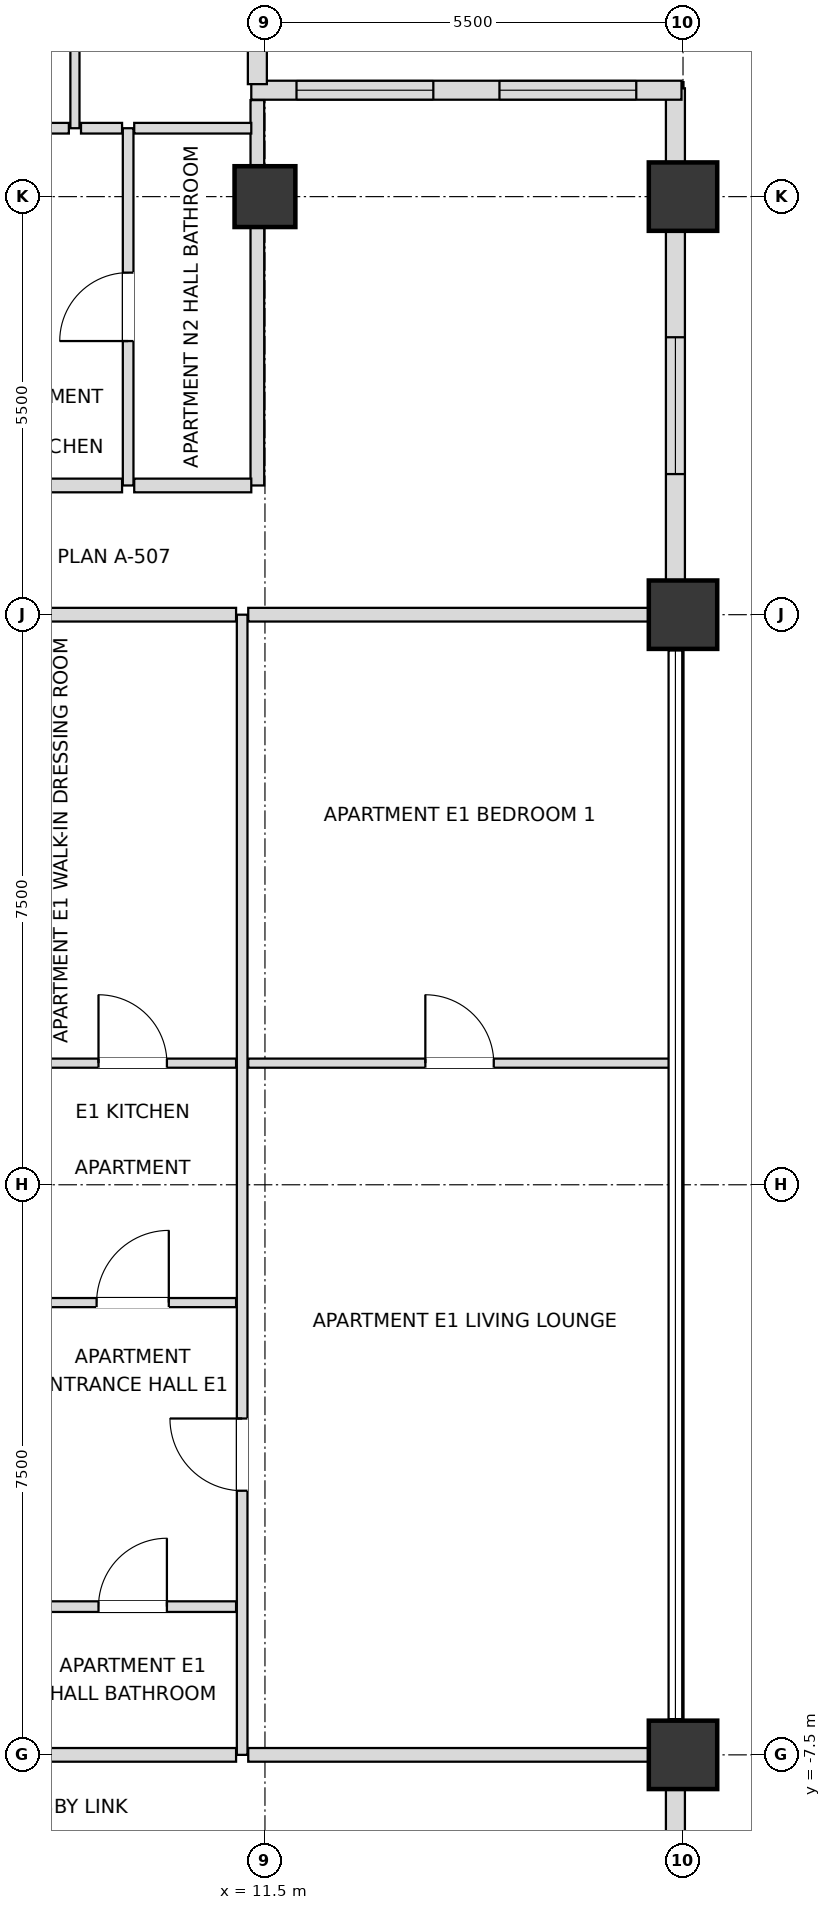
"""IFC4 building model, lengths in metres.
Left out: names, types, materials, properties, quantities, classifications, styles, units other than length and angle.
Written with IfcOpenShell. Run it as: python <this file> out.ifc"""

import sys

from ifc_helpers import new_model, si_unit, direction, frame, frame_2d, origin, origin_2d, place, context, subcontext, project, spatial, rectangle, extrude, element, fill, save


model = new_model("IFC4")
c1 = context("Model", 3, precision=1e-05, world=origin(), true_north=direction((0.0, 1.0)))
c2 = subcontext(c1, "Body", "Model", "MODEL_VIEW")
j1 = project(units=[si_unit("LENGTHUNIT", "METRE"), si_unit("PLANEANGLEUNIT", "RADIAN")], contexts=[c1])
p1 = place(None, origin())
s1 = spatial("IfcSite", under=j1, at=p1, CompositionType="ELEMENT")
p2 = place(p1, origin())
s2 = spatial("IfcBuilding", under=s1, at=p2, CompositionType="ELEMENT")
p3 = place(p2, frame((0.0, 0.0, 243.9)))
s3 = spatial("IfcBuildingStorey", under=s2, at=p3, CompositionType="ELEMENT", Elevation=243.9)
for number, where, z_axis, x_axis in (
    (1, (17.0, -7.5, 0.0), (0.0, 0.0, 1.0), (1.0, 0.0, 0.0)),
    (2, (17.0, 7.5, 0.0), (0.0, 0.0, 1.0), (1.0, 0.0, 0.0)),
    (3, (17.0, 13.0, 0.0), (0.0, 0.0, 1.0), (1.0, 0.0, 0.0)),
):
    element("IfcColumn", number, at=place(p3, frame(where, z_axis=z_axis, x_axis=x_axis)), inside=s3, PredefinedType="USERDEFINED", context=c2, shape_type="SweptSolid", body=[
        extrude(rectangle(XDim=0.9, YDim=0.9, at=origin_2d()), origin(), (0.0, 0.0, 1.0), 3.6),
    ])
p4 = place(p3, frame((11.5, 13.0, 0.0), z_axis=(0.0, 0.0, 1.0), x_axis=(1.0, 0.0, 0.0)))
e4 = element("IfcColumn", 4, at=p4, inside=s3, PredefinedType="COLUMN", context=c2, shape_type="SweptSolid", body=[
    extrude(rectangle(XDim=0.8, YDim=0.8, at=origin_2d()), origin(), (0.0, 0.0, 1.0), 3.6),
])
p5 = place(p3, frame((16.9, -12.555, 0.0), z_axis=(0.0, 0.0, 1.0), x_axis=(0.0, 1.0, 0.0)))
e5 = element("IfcWall", 5, at=p5, inside=s3, PredefinedType="SOLIDWALL", context=c2, shape_type="SweptSolid", body=[
    extrude(rectangle(XDim=4.61, YDim=0.25, at=frame_2d((2.305, 0.0))), origin(), (0.0, 0.0, 1.0), 2.748),
])
p6 = place(p5, frame((1.405, 0.0, 0.72)))
e6 = element("IfcOpeningElement", 6, at=p6, cuts=e5, PredefinedType="OPENING", context=c2, shape_type="SweptSolid", body=[
    extrude(rectangle(XDim=1.8, YDim=1.68, at=frame_2d((0.9, 0.84))), frame((0.0, 0.135, 0.0), z_axis=(0.0, -1.0, 0.0), x_axis=(1.0, 0.0, 0.0)), (0.0, 0.0, 1.0), 0.27),
])
p7 = place(p3, frame((16.9, 7.945, 0.0), z_axis=(0.0, 0.0, 1.0), x_axis=(0.0, 1.0, 0.0)))
e7 = element("IfcWall", 7, at=p7, inside=s3, PredefinedType="SOLIDWALL", context=c2, shape_type="SweptSolid", body=[
    extrude(rectangle(XDim=4.61, YDim=0.25, at=frame_2d((2.305, 0.0))), origin(), (0.0, 0.0, 1.0), 2.748),
])
p8 = place(p7, frame((1.405, 0.0, 0.72)))
e8 = element("IfcOpeningElement", 8, at=p8, cuts=e7, PredefinedType="OPENING", context=c2, shape_type="SweptSolid", body=[
    extrude(rectangle(XDim=1.8, YDim=1.68, at=frame_2d((0.9, 0.84))), frame((0.0, 0.135, 0.0), z_axis=(0.0, -1.0, 0.0), x_axis=(1.0, 0.0, 0.0)), (0.0, 0.0, 1.0), 0.27),
])
p9 = place(p3, frame((16.9, 13.445, 0.0), z_axis=(0.0, 0.0, 1.0), x_axis=(0.0, 1.0, 0.0)))
e9 = element("IfcWall", 9, at=p9, inside=s3, PredefinedType="SOLIDWALL", context=c2, shape_type="SweptSolid", body=[
    extrude(rectangle(XDim=0.98, YDim=0.25, at=frame_2d((0.49, 0.0))), origin(), (0.0, 0.0, 1.0), 2.748),
])
p10 = place(p3, frame((16.98, 14.4, 0.0), z_axis=(0.0, 0.0, 1.0), x_axis=(-1.0, 0.0, 0.0)))
e10 = element("IfcWall", 10, at=p10, inside=s3, PredefinedType="SOLIDWALL", context=c2, shape_type="SweptSolid", body=[
    extrude(rectangle(XDim=5.66, YDim=0.25, at=frame_2d((2.83, 0.0))), origin(), (0.0, 0.0, 1.0), 2.748),
])
p11 = place(p10, frame((0.595, 0.0, 0.72)))
e11 = element("IfcOpeningElement", 11, at=p11, cuts=e10, PredefinedType="OPENING", context=c2, shape_type="SweptSolid", body=[
    extrude(rectangle(XDim=1.8, YDim=1.68, at=frame_2d((0.9, 0.84))), frame((0.0, 0.135, 0.0), z_axis=(0.0, -1.0, 0.0), x_axis=(1.0, 0.0, 0.0)), (0.0, 0.0, 1.0), 0.27),
])
p12 = place(p10, frame((3.265, 0.0, 0.72)))
e12 = element("IfcOpeningElement", 12, at=p12, cuts=e10, PredefinedType="OPENING", context=c2, shape_type="SweptSolid", body=[
    extrude(rectangle(XDim=1.8, YDim=1.68, at=frame_2d((0.9, 0.84))), frame((0.0, 0.135, 0.0), z_axis=(0.0, -1.0, 0.0), x_axis=(1.0, 0.0, 0.0)), (0.0, 0.0, 1.0), 0.27),
])
p13 = place(p3, frame((11.4, 14.48, 0.0), z_axis=(0.0, 0.0, 1.0), x_axis=(0.0, 1.0, 0.0)))
e13 = element("IfcWall", 13, at=p13, inside=s3, PredefinedType="SOLIDWALL", context=c2, shape_type="SweptSolid", body=[
    extrude(rectangle(XDim=5.34, YDim=0.25, at=frame_2d((2.67, 0.0))), origin(), (0.0, 0.0, 1.0), 2.748),
])
p14 = place(p13, frame((1.615, 0.0, 0.72)))
e14 = element("IfcOpeningElement", 14, at=p14, cuts=e13, PredefinedType="OPENING", context=c2, shape_type="SweptSolid", body=[
    extrude(rectangle(XDim=1.8, YDim=1.68, at=frame_2d((0.9, 0.84))), frame((0.0, 0.135, 0.0), z_axis=(0.0, -1.0, 0.0), x_axis=(1.0, 0.0, 0.0)), (0.0, 0.0, 1.0), 0.27),
])
p15 = place(p3, frame((9.0, 13.9, 0.0), z_axis=(0.0, 0.0, 1.0), x_axis=(0.0, 1.0, 0.0)))
e15 = element("IfcWall", 15, at=p15, inside=s3, PredefinedType="PARTITIONING", context=c2, shape_type="SweptSolid", body=[
    extrude(rectangle(XDim=6.0, YDim=0.12, at=frame_2d((3.0, 0.0))), origin(), (0.0, 0.0, 1.0), 3.38),
])
p16 = place(p15, frame((2.55, 0.0, 0.0)))
e16 = element("IfcOpeningElement", 16, at=p16, cuts=e15, PredefinedType="OPENING", context=c2, shape_type="SweptSolid", body=[
    extrude(rectangle(XDim=0.9, YDim=2.1, at=frame_2d((0.45, 1.05))), frame((0.0, 0.07, 0.0), z_axis=(0.0, -1.0, 0.0), x_axis=(1.0, 0.0, 0.0)), (0.0, 0.0, 1.0), 0.14),
])
p17 = place(p3, frame((9.7, 9.2, 0.0), z_axis=(0.0, 0.0, 1.0), x_axis=(0.0, 1.0, 0.0)))
e17 = element("IfcWall", 17, at=p17, inside=s3, PredefinedType="PARTITIONING", context=c2, shape_type="SweptSolid", body=[
    extrude(rectangle(XDim=4.7, YDim=0.14, at=frame_2d((2.35, 0.0))), origin(), (0.0, 0.0, 1.0), 2.826),
])
p18 = place(p17, frame((1.9, 0.0, 0.0)))
e18 = element("IfcOpeningElement", 18, at=p18, cuts=e17, PredefinedType="OPENING", context=c2, shape_type="SweptSolid", body=[
    extrude(rectangle(XDim=0.9, YDim=2.1, at=frame_2d((0.45, 1.05))), frame((0.0, 0.08, 0.0), z_axis=(0.0, -1.0, 0.0), x_axis=(1.0, 0.0, 0.0)), (0.0, 0.0, 1.0), 0.16),
])
p19 = place(p3, frame((11.2, -7.5, 0.0), z_axis=(0.0, 0.0, 1.0), x_axis=(0.0, 1.0, 0.0)))
e19 = element("IfcWall", 19, at=p19, inside=s3, PredefinedType="PARTITIONING", context=c2, shape_type="SweptSolid", body=[
    extrude(rectangle(XDim=15.0, YDim=0.14, at=frame_2d((7.5, 0.0))), origin(), (0.0, 0.0, 1.0), 3.38),
])
p20 = place(p19, frame((3.475, 0.0, 0.0)))
e20 = element("IfcOpeningElement", 20, at=p20, cuts=e19, PredefinedType="OPENING", context=c2, shape_type="SweptSolid", body=[
    extrude(rectangle(XDim=0.95, YDim=2.1, at=frame_2d((0.475, 1.05))), frame((0.0, 0.08, 0.0), z_axis=(0.0, -1.0, 0.0), x_axis=(1.0, 0.0, 0.0)), (0.0, 0.0, 1.0), 0.16),
])
p21 = place(p3, frame((11.4, 9.2, 0.0), z_axis=(0.0, 0.0, 1.0), x_axis=(0.0, 1.0, 0.0)))
e21 = element("IfcWall", 21, at=p21, inside=s3, PredefinedType="PARTITIONING", context=c2, shape_type="SweptSolid", body=[
    extrude(rectangle(XDim=5.07, YDim=0.18, at=frame_2d((2.535, 0.0))), origin(), (0.0, 0.0, 1.0), 2.748),
])
p22 = place(p3, frame((8.38, -7.5, 0.0), z_axis=(0.0, 0.0, 1.0), x_axis=(1.0, 0.0, 0.0)))
e22 = element("IfcWall", 22, at=p22, inside=s3, PredefinedType="PARTITIONING", context=c2, shape_type="SweptSolid", body=[
    extrude(rectangle(XDim=2.74, YDim=0.18, at=frame_2d((1.37, 0.0))), origin(), (0.0, 0.0, 1.0), 2.826),
])
p23 = place(p3, frame((11.28, -7.5, 0.0), z_axis=(0.0, 0.0, 1.0), x_axis=(1.0, 0.0, 0.0)))
e23 = element("IfcWall", 23, at=p23, inside=s3, PredefinedType="PARTITIONING", context=c2, shape_type="SweptSolid", body=[
    extrude(rectangle(XDim=5.62, YDim=0.18, at=frame_2d((2.81, 0.0))), origin(), (0.0, 0.0, 1.0), 2.826),
])
p24 = place(p3, frame((8.38, -5.55, 0.0), z_axis=(0.0, 0.0, 1.0), x_axis=(1.0, 0.0, 0.0)))
e24 = element("IfcWall", 24, at=p24, inside=s3, PredefinedType="PARTITIONING", context=c2, shape_type="SweptSolid", body=[
    extrude(rectangle(XDim=2.74, YDim=0.14, at=frame_2d((1.37, 0.0))), origin(), (0.0, 0.0, 1.0), 3.38),
])
p25 = place(p24, frame((0.93, 0.0, 0.0)))
e25 = element("IfcOpeningElement", 25, at=p25, cuts=e24, PredefinedType="OPENING", context=c2, shape_type="SweptSolid", body=[
    extrude(rectangle(XDim=0.9, YDim=2.1, at=frame_2d((0.45, 1.05))), frame((0.0, 0.08, 0.0), z_axis=(0.0, -1.0, 0.0), x_axis=(1.0, 0.0, 0.0)), (0.0, 0.0, 1.0), 0.16),
])
p26 = place(p3, frame((8.38, -1.55, 0.0), z_axis=(0.0, 0.0, 1.0), x_axis=(1.0, 0.0, 0.0)))
e26 = element("IfcWall", 26, at=p26, inside=s3, PredefinedType="PARTITIONING", context=c2, shape_type="SweptSolid", body=[
    extrude(rectangle(XDim=2.74, YDim=0.12, at=frame_2d((1.37, 0.0))), origin(), (0.0, 0.0, 1.0), 3.38),
])
p27 = place(p26, frame((0.905, 0.0, 0.0)))
e27 = element("IfcOpeningElement", 27, at=p27, cuts=e26, PredefinedType="OPENING", context=c2, shape_type="SweptSolid", body=[
    extrude(rectangle(XDim=0.95, YDim=2.1, at=frame_2d((0.475, 1.05))), frame((0.0, 0.07, 0.0), z_axis=(0.0, -1.0, 0.0), x_axis=(1.0, 0.0, 0.0)), (0.0, 0.0, 1.0), 0.14),
])
p28 = place(p3, frame((8.38, 1.6, 0.0), z_axis=(0.0, 0.0, 1.0), x_axis=(1.0, 0.0, 0.0)))
e28 = element("IfcWall", 28, at=p28, inside=s3, PredefinedType="PARTITIONING", context=c2, shape_type="SweptSolid", body=[
    extrude(rectangle(XDim=2.74, YDim=0.12, at=frame_2d((1.37, 0.0))), origin(), (0.0, 0.0, 1.0), 3.38),
])
p29 = place(p28, frame((0.93, 0.0, 0.0)))
e29 = element("IfcOpeningElement", 29, at=p29, cuts=e28, PredefinedType="OPENING", context=c2, shape_type="SweptSolid", body=[
    extrude(rectangle(XDim=0.9, YDim=2.1, at=frame_2d((0.45, 1.05))), frame((0.0, 0.07, 0.0), z_axis=(0.0, -1.0, 0.0), x_axis=(1.0, 0.0, 0.0)), (0.0, 0.0, 1.0), 0.14),
])
p30 = place(p3, frame((11.28, 1.6, 0.0), z_axis=(0.0, 0.0, 1.0), x_axis=(1.0, 0.0, 0.0)))
e30 = element("IfcWall", 30, at=p30, inside=s3, PredefinedType="PARTITIONING", context=c2, shape_type="SweptSolid", body=[
    extrude(rectangle(XDim=5.54, YDim=0.12, at=frame_2d((2.77, 0.0))), origin(), (0.0, 0.0, 1.0), 3.018),
])
p31 = place(p30, frame((2.33, 0.0, 0.0)))
e31 = element("IfcOpeningElement", 31, at=p31, cuts=e30, PredefinedType="OPENING", context=c2, shape_type="SweptSolid", body=[
    extrude(rectangle(XDim=0.9, YDim=2.1, at=frame_2d((0.45, 1.05))), frame((0.0, 0.07, 0.0), z_axis=(0.0, -1.0, 0.0), x_axis=(1.0, 0.0, 0.0)), (0.0, 0.0, 1.0), 0.14),
])
p32 = place(p3, frame((8.38, 7.5, 0.0), z_axis=(0.0, 0.0, 1.0), x_axis=(1.0, 0.0, 0.0)))
e32 = element("IfcWall", 32, at=p32, inside=s3, PredefinedType="PARTITIONING", context=c2, shape_type="SweptSolid", body=[
    extrude(rectangle(XDim=2.74, YDim=0.18, at=frame_2d((1.37, 0.0))), origin(), (0.0, 0.0, 1.0), 2.826),
])
p33 = place(p3, frame((11.28, 7.5, 0.0), z_axis=(0.0, 0.0, 1.0), x_axis=(1.0, 0.0, 0.0)))
e33 = element("IfcWall", 33, at=p33, inside=s3, PredefinedType="PARTITIONING", context=c2, shape_type="SweptSolid", body=[
    extrude(rectangle(XDim=5.62, YDim=0.18, at=frame_2d((2.81, 0.0))), origin(), (0.0, 0.0, 1.0), 2.826),
])
p34 = place(p3, frame((7.73, 9.2, 0.0), z_axis=(0.0, 0.0, 1.0), x_axis=(1.0, 0.0, 0.0)))
e34 = element("IfcWall", 34, at=p34, inside=s3, PredefinedType="PARTITIONING", context=c2, shape_type="SweptSolid", body=[
    extrude(rectangle(XDim=1.89, YDim=0.18, at=frame_2d((0.945, 0.0))), origin(), (0.0, 0.0, 1.0), 3.38),
])
p35 = place(p3, frame((9.78, 9.2, 0.0), z_axis=(0.0, 0.0, 1.0), x_axis=(1.0, 0.0, 0.0)))
e35 = element("IfcWall", 35, at=p35, inside=s3, PredefinedType="PARTITIONING", context=c2, shape_type="SweptSolid", body=[
    extrude(rectangle(XDim=1.54, YDim=0.18, at=frame_2d((0.77, 0.0))), origin(), (0.0, 0.0, 1.0), 3.38),
])
p36 = place(p3, frame((7.73, 13.9, 0.0), z_axis=(0.0, 0.0, 1.0), x_axis=(1.0, 0.0, 0.0)))
e36 = element("IfcWall", 36, at=p36, inside=s3, PredefinedType="PARTITIONING", context=c2, shape_type="SweptSolid", body=[
    extrude(rectangle(XDim=1.19, YDim=0.14, at=frame_2d((0.595, 0.0))), origin(), (0.0, 0.0, 1.0), 3.38),
])
p37 = place(p3, frame((9.08, 13.9, 0.0), z_axis=(0.0, 0.0, 1.0), x_axis=(1.0, 0.0, 0.0)))
e37 = element("IfcWall", 37, at=p37, inside=s3, PredefinedType="PARTITIONING", context=c2, shape_type="SweptSolid", body=[
    extrude(rectangle(XDim=0.54, YDim=0.14, at=frame_2d((0.27, 0.0))), origin(), (0.0, 0.0, 1.0), 3.38),
])
p38 = place(p3, frame((9.78, 13.9, 0.0), z_axis=(0.0, 0.0, 1.0), x_axis=(1.0, 0.0, 0.0)))
e38 = element("IfcWall", 38, at=p38, inside=s3, PredefinedType="PARTITIONING", context=c2, shape_type="SweptSolid", body=[
    extrude(rectangle(XDim=1.54, YDim=0.14, at=frame_2d((0.77, 0.0))), origin(), (0.0, 0.0, 1.0), 3.38),
])
p39 = place(p8, origin())
e39 = element("IfcWindow", 39, at=p39, inside=s3, PartitioningType="SINGLE_PANEL", PredefinedType="WINDOW", context=c2, shape_type="SweptSolid", body=[
    extrude(rectangle(XDim=1.8, YDim=1.68, at=frame_2d((0.9, 0.84))), frame((0.0, 0.03, 0.0), z_axis=(0.0, -1.0, 0.0), x_axis=(1.0, 0.0, 0.0)), (0.0, 0.0, 1.0), 0.06),
])
fill(e8, e39)
p40 = place(p11, origin())
e40 = element("IfcWindow", 40, at=p40, inside=s3, PartitioningType="SINGLE_PANEL", PredefinedType="WINDOW", context=c2, shape_type="SweptSolid", body=[
    extrude(rectangle(XDim=1.8, YDim=1.68, at=frame_2d((0.9, 0.84))), frame((0.0, 0.03, 0.0), z_axis=(0.0, -1.0, 0.0), x_axis=(1.0, 0.0, 0.0)), (0.0, 0.0, 1.0), 0.06),
])
fill(e11, e40)
p41 = place(p12, origin())
e41 = element("IfcWindow", 41, at=p41, inside=s3, PartitioningType="SINGLE_PANEL", PredefinedType="WINDOW", context=c2, shape_type="SweptSolid", body=[
    extrude(rectangle(XDim=1.8, YDim=1.68, at=frame_2d((0.9, 0.84))), frame((0.0, 0.03, 0.0), z_axis=(0.0, -1.0, 0.0), x_axis=(1.0, 0.0, 0.0)), (0.0, 0.0, 1.0), 0.06),
])
fill(e12, e41)
p42 = place(p18, origin())
e42 = element("IfcDoor", 42, at=p42, inside=s3, OperationType="SINGLE_SWING_LEFT", PredefinedType="DOOR", context=c2, shape_type="SweptSolid", body=[
    extrude(rectangle(XDim=0.9, YDim=2.1, at=frame_2d((0.45, 1.05))), frame((0.0, 0.025, 0.0), z_axis=(0.0, -1.0, 0.0), x_axis=(1.0, 0.0, 0.0)), (0.0, 0.0, 1.0), 0.05),
])
fill(e18, e42)
p43 = place(p25, origin())
e43 = element("IfcDoor", 43, at=p43, inside=s3, OperationType="SINGLE_SWING_RIGHT", PredefinedType="DOOR", context=c2, shape_type="SweptSolid", body=[
    extrude(rectangle(XDim=0.9, YDim=2.1, at=frame_2d((0.45, 1.05))), frame((0.0, 0.025, 0.0), z_axis=(0.0, -1.0, 0.0), x_axis=(1.0, 0.0, 0.0)), (0.0, 0.0, 1.0), 0.05),
])
fill(e25, e43)
p44 = place(p27, origin())
e44 = element("IfcDoor", 44, at=p44, inside=s3, OperationType="SINGLE_SWING_RIGHT", PredefinedType="DOOR", context=c2, shape_type="SweptSolid", body=[
    extrude(rectangle(XDim=0.95, YDim=2.1, at=frame_2d((0.475, 1.05))), frame((0.0, 0.025, 0.0), z_axis=(0.0, -1.0, 0.0), x_axis=(1.0, 0.0, 0.0)), (0.0, 0.0, 1.0), 0.05),
])
fill(e27, e44)
p45 = place(p29, origin())
e45 = element("IfcDoor", 45, at=p45, inside=s3, OperationType="SINGLE_SWING_LEFT", PredefinedType="DOOR", context=c2, shape_type="SweptSolid", body=[
    extrude(rectangle(XDim=0.9, YDim=2.1, at=frame_2d((0.45, 1.05))), frame((0.0, 0.025, 0.0), z_axis=(0.0, -1.0, 0.0), x_axis=(1.0, 0.0, 0.0)), (0.0, 0.0, 1.0), 0.05),
])
fill(e29, e45)
p46 = place(p20, origin())
e46 = element("IfcDoor", 46, at=p46, inside=s3, OperationType="SINGLE_SWING_RIGHT", PredefinedType="DOOR", context=c2, shape_type="SweptSolid", body=[
    extrude(rectangle(XDim=0.95, YDim=2.1, at=frame_2d((0.475, 1.05))), frame((0.0, 0.025, 0.0), z_axis=(0.0, -1.0, 0.0), x_axis=(1.0, 0.0, 0.0)), (0.0, 0.0, 1.0), 0.05),
])
fill(e20, e46)
p47 = place(p31, origin())
e47 = element("IfcDoor", 47, at=p47, inside=s3, OperationType="SINGLE_SWING_LEFT", PredefinedType="DOOR", context=c2, shape_type="SweptSolid", body=[
    extrude(rectangle(XDim=0.9, YDim=2.1, at=frame_2d((0.45, 1.05))), frame((0.0, 0.025, 0.0), z_axis=(0.0, -1.0, 0.0), x_axis=(1.0, 0.0, 0.0)), (0.0, 0.0, 1.0), 0.05),
])
fill(e31, e47)
save(model, sys.argv[1])
